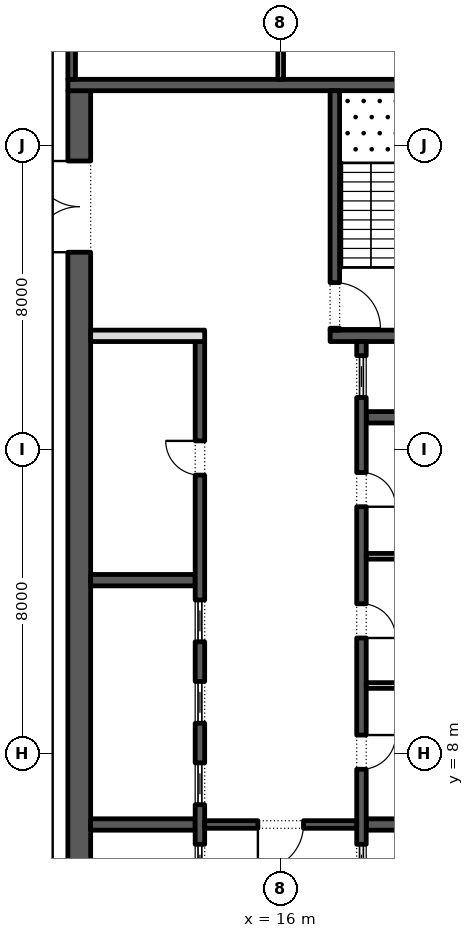
"""IFC4 building model, lengths in metres.
Left out: names, types, materials, properties, quantities, classifications, styles, units other than length and angle.
Written with IfcOpenShell. Run it as: python <this file> out.ifc"""

import sys

from ifc_helpers import new_model, si_unit, direction, frame, frame_2d, origin, place, context, subcontext, project, spatial, rectangle, extrude, element, fill, save


model = new_model("IFC4")
c1 = context("Model", 3, precision=1e-05, world=origin(), true_north=direction((0.0, 1.0)))
c2 = subcontext(c1, "Body", "Model", "MODEL_VIEW")
j1 = project(units=[si_unit("LENGTHUNIT", "METRE"), si_unit("PLANEANGLEUNIT", "RADIAN")], contexts=[c1])
p1 = place(None, origin())
s1 = spatial("IfcSite", under=j1, at=p1, CompositionType="ELEMENT")
p2 = place(p1, origin())
s2 = spatial("IfcBuilding", under=s1, at=p2, CompositionType="ELEMENT")
p3 = place(p2, frame((0.0, 0.0, 289.2)))
s3 = spatial("IfcBuildingStorey", under=s2, at=p3, CompositionType="ELEMENT", Elevation=289.2)
p4 = place(p3, frame((10.7, -2.45, 0.0), z_axis=(0.0, 0.0, 1.0), x_axis=(0.0, 1.0, 0.0)))
e1 = element("IfcWall", 1, at=p4, inside=s3, PredefinedType="SHEAR", context=c2, shape_type="SweptSolid", body=[
    extrude(rectangle(XDim=27.9, YDim=0.6, at=frame_2d((13.95, 0.0))), origin(), (0.0, 0.0, 1.0), 3.95),
])
p5 = place(p4, frame((23.65, 0.0, 0.0)))
e2 = element("IfcOpeningElement", 2, at=p5, cuts=e1, PredefinedType="OPENING", context=c2, shape_type="SweptSolid", body=[
    extrude(rectangle(XDim=2.4, YDim=2.1, at=frame_2d((1.2, 1.05))), frame((0.0, 0.31, 0.0), z_axis=(0.0, -1.0, 0.0), x_axis=(1.0, 0.0, 0.0)), (0.0, 0.0, 1.0), 0.62),
])
p6 = place(p4, frame((1.387, 0.0, 0.0)))
e3 = element("IfcOpeningElement", 3, at=p6, cuts=e1, PredefinedType="OPENING", context=c2, shape_type="SweptSolid", body=[
    extrude(rectangle(XDim=0.9, YDim=2.1, at=frame_2d((0.45, 1.05))), frame((0.0, 0.31, 0.0), z_axis=(0.0, -1.0, 0.0), x_axis=(1.0, 0.0, 0.0)), (0.0, 0.0, 1.0), 0.62),
])
p7 = place(p4, frame((4.562, 0.0, 0.0)))
e4 = element("IfcOpeningElement", 4, at=p7, cuts=e1, PredefinedType="OPENING", context=c2, shape_type="SweptSolid", body=[
    extrude(rectangle(XDim=1.0, YDim=2.1, at=frame_2d((0.5, 1.05))), frame((0.0, 0.31, 0.0), z_axis=(0.0, -1.0, 0.0), x_axis=(1.0, 0.0, 0.0)), (0.0, 0.0, 1.0), 0.62),
])
p8 = place(p3, frame((10.4, 25.6, 0.0), z_axis=(0.0, 0.0, 1.0), x_axis=(1.0, 0.0, 0.0)))
e5 = element("IfcWall", 5, at=p8, inside=s3, PredefinedType="SHEAR", context=c2, shape_type="SweptSolid", body=[
    extrude(rectangle(XDim=11.2, YDim=0.3, at=frame_2d((5.6, 0.0))), origin(), (0.0, 0.0, 1.0), 3.95),
])
p9 = place(p3, frame((17.3, 19.0, 0.0), z_axis=(0.0, 0.0, 1.0), x_axis=(1.0, 0.0, 0.0)))
e6 = element("IfcWall", 6, at=p9, inside=s3, PredefinedType="SHEAR", context=c2, shape_type="SweptSolid", body=[
    extrude(rectangle(XDim=3.7, YDim=0.3, at=frame_2d((1.85, 0.0))), origin(), (0.0, 0.0, 1.0), 3.95),
])
p10 = place(p3, frame((17.425, 19.15, 0.0), z_axis=(0.0, 0.0, 1.0), x_axis=(0.0, 1.0, 0.0)))
e7 = element("IfcWall", 7, at=p10, inside=s3, PredefinedType="SHEAR", context=c2, shape_type="SweptSolid", body=[
    extrude(rectangle(XDim=6.3, YDim=0.25, at=frame_2d((3.15, 0.0))), origin(), (0.0, 0.0, 1.0), 3.95),
])
p11 = place(p10, frame((0.05, 0.0, 0.0)))
e8 = element("IfcOpeningElement", 8, at=p11, cuts=e7, PredefinedType="OPENING", context=c2, shape_type="SweptSolid", body=[
    extrude(rectangle(XDim=1.2, YDim=2.1, at=frame_2d((0.6, 1.05))), frame((0.0, 0.135, 0.0), z_axis=(0.0, -1.0, 0.0), x_axis=(1.0, 0.0, 0.0)), (0.0, 0.0, 1.0), 0.27),
])
for number, where, z_axis, x_axis in (
    (9, (18.25, 6.143, 0.0), (0.0, 0.0, 1.0), (1.0, 0.0, 0.0)),
    (10, (18.25, 16.857, 0.0), (0.0, 0.0, 1.0), (1.0, 0.0, 0.0)),
):
    element("IfcWall", number, at=place(p3, frame(where, z_axis=z_axis, x_axis=x_axis)), inside=s3, PredefinedType="SHEAR", context=c2, shape_type="SweptSolid", body=[
        extrude(rectangle(XDim=2.75, YDim=0.3, at=frame_2d((1.375, 0.0))), origin(), (0.0, 0.0, 1.0), 3.95),
    ])
p12 = place(p3, frame((18.125, 4.15, 0.0), z_axis=(0.0, 0.0, 1.0), x_axis=(0.0, 1.0, 0.0)))
e11 = element("IfcWall", 11, at=p12, inside=s3, PredefinedType="SHEAR", context=c2, shape_type="SweptSolid", body=[
    extrude(rectangle(XDim=14.7, YDim=0.25, at=frame_2d((7.35, 0.0))), origin(), (0.0, 0.0, 1.0), 3.95),
])
p13 = place(p12, frame((3.446, 0.0, 0.0)))
e12 = element("IfcOpeningElement", 12, at=p13, cuts=e11, PredefinedType="OPENING", context=c2, shape_type="SweptSolid", body=[
    extrude(rectangle(XDim=0.9, YDim=2.1, at=frame_2d((0.45, 1.05))), frame((0.0, 0.135, 0.0), z_axis=(0.0, -1.0, 0.0), x_axis=(1.0, 0.0, 0.0)), (0.0, 0.0, 1.0), 0.27),
])
p14 = place(p12, frame((6.9, 0.0, 0.0)))
e13 = element("IfcOpeningElement", 13, at=p14, cuts=e11, PredefinedType="OPENING", context=c2, shape_type="SweptSolid", body=[
    extrude(rectangle(XDim=0.9, YDim=2.1, at=frame_2d((0.45, 1.05))), frame((0.0, 0.135, 0.0), z_axis=(0.0, -1.0, 0.0), x_axis=(1.0, 0.0, 0.0)), (0.0, 0.0, 1.0), 0.27),
])
p15 = place(p12, frame((10.354, 0.0, 0.0)))
e14 = element("IfcOpeningElement", 14, at=p15, cuts=e11, PredefinedType="OPENING", context=c2, shape_type="SweptSolid", body=[
    extrude(rectangle(XDim=0.9, YDim=2.1, at=frame_2d((0.45, 1.05))), frame((0.0, 0.135, 0.0), z_axis=(0.0, -1.0, 0.0), x_axis=(1.0, 0.0, 0.0)), (0.0, 0.0, 1.0), 0.27),
])
p16 = place(p12, frame((0.371, 0.0, 0.0)))
e15 = element("IfcOpeningElement", 15, at=p16, cuts=e11, PredefinedType="OPENING", context=c2, shape_type="SweptSolid", body=[
    extrude(rectangle(XDim=1.1, YDim=2.1, at=frame_2d((0.55, 1.05))), frame((0.0, 0.135, 0.0), z_axis=(0.0, -1.0, 0.0), x_axis=(1.0, 0.0, 0.0)), (0.0, 0.0, 1.0), 0.27),
])
p17 = place(p12, frame((13.229, 0.0, 0.0)))
e16 = element("IfcOpeningElement", 16, at=p17, cuts=e11, PredefinedType="OPENING", context=c2, shape_type="SweptSolid", body=[
    extrude(rectangle(XDim=1.1, YDim=2.1, at=frame_2d((0.55, 1.05))), frame((0.0, 0.135, 0.0), z_axis=(0.0, -1.0, 0.0), x_axis=(1.0, 0.0, 0.0)), (0.0, 0.0, 1.0), 0.27),
])
for number, where, z_axis, x_axis in (
    (17, (18.25, 9.8, 0.0), (0.0, 0.0, 1.0), (1.0, 0.0, 0.0)),
    (18, (18.25, 13.2, 0.0), (0.0, 0.0, 1.0), (1.0, 0.0, 0.0)),
):
    element("IfcWall", number, at=place(p3, frame(where, z_axis=z_axis, x_axis=x_axis)), inside=s3, PredefinedType="PARTITIONING", context=c2, shape_type="SweptSolid", body=[
        extrude(rectangle(XDim=2.75, YDim=0.15, at=frame_2d((1.375, 0.0))), origin(), (0.0, 0.0, 1.0), 3.95),
    ])
for number, where, z_axis, x_axis in (
    (19, (11.0, 6.143, 0.0), (0.0, 0.0, 1.0), (1.0, 0.0, 0.0)),
    (20, (11.0, 12.571, 0.0), (0.0, 0.0, 1.0), (1.0, 0.0, 0.0)),
):
    element("IfcWall", number, at=place(p3, frame(where, z_axis=z_axis, x_axis=x_axis)), inside=s3, PredefinedType="SHEAR", context=c2, shape_type="SweptSolid", body=[
        extrude(rectangle(XDim=2.75, YDim=0.3, at=frame_2d((1.375, 0.0))), origin(), (0.0, 0.0, 1.0), 3.95),
    ])
p18 = place(p3, frame((13.875, -2.45, 0.0), z_axis=(0.0, 0.0, 1.0), x_axis=(0.0, 1.0, 0.0)))
e21 = element("IfcWall", 21, at=p18, inside=s3, PredefinedType="SHEAR", context=c2, shape_type="SweptSolid", body=[
    extrude(rectangle(XDim=21.3, YDim=0.25, at=frame_2d((10.65, 0.0))), origin(), (0.0, 0.0, 1.0), 3.95),
])
p19 = place(p18, frame((17.786, 0.0, 0.0)))
e22 = element("IfcOpeningElement", 22, at=p19, cuts=e21, PredefinedType="OPENING", context=c2, shape_type="SweptSolid", body=[
    extrude(rectangle(XDim=0.9, YDim=2.1, at=frame_2d((0.45, 1.05))), frame((0.0, 0.135, 0.0), z_axis=(0.0, -1.0, 0.0), x_axis=(1.0, 0.0, 0.0)), (0.0, 0.0, 1.0), 0.27),
])
p20 = place(p18, frame((6.971, 0.0, 0.0)))
e23 = element("IfcOpeningElement", 23, at=p20, cuts=e21, PredefinedType="OPENING", context=c2, shape_type="SweptSolid", body=[
    extrude(rectangle(XDim=1.1, YDim=2.1, at=frame_2d((0.55, 1.05))), frame((0.0, 0.135, 0.0), z_axis=(0.0, -1.0, 0.0), x_axis=(1.0, 0.0, 0.0)), (0.0, 0.0, 1.0), 0.27),
])
p21 = place(p18, frame((9.114, 0.0, 0.0)))
e24 = element("IfcOpeningElement", 24, at=p21, cuts=e21, PredefinedType="OPENING", context=c2, shape_type="SweptSolid", body=[
    extrude(rectangle(XDim=1.1, YDim=2.1, at=frame_2d((0.55, 1.05))), frame((0.0, 0.135, 0.0), z_axis=(0.0, -1.0, 0.0), x_axis=(1.0, 0.0, 0.0)), (0.0, 0.0, 1.0), 0.27),
])
p22 = place(p18, frame((11.257, 0.0, 0.0)))
e25 = element("IfcOpeningElement", 25, at=p22, cuts=e21, PredefinedType="OPENING", context=c2, shape_type="SweptSolid", body=[
    extrude(rectangle(XDim=1.1, YDim=2.1, at=frame_2d((0.55, 1.05))), frame((0.0, 0.135, 0.0), z_axis=(0.0, -1.0, 0.0), x_axis=(1.0, 0.0, 0.0)), (0.0, 0.0, 1.0), 0.27),
])
p23 = place(p18, frame((13.4, 0.0, 0.0)))
e26 = element("IfcOpeningElement", 26, at=p23, cuts=e21, PredefinedType="OPENING", context=c2, shape_type="SweptSolid", body=[
    extrude(rectangle(XDim=1.1, YDim=2.1, at=frame_2d((0.55, 1.05))), frame((0.0, 0.135, 0.0), z_axis=(0.0, -1.0, 0.0), x_axis=(1.0, 0.0, 0.0)), (0.0, 0.0, 1.0), 0.27),
])
p24 = place(p3, frame((11.0, 19.0, 0.0), z_axis=(0.0, 0.0, 1.0), x_axis=(1.0, 0.0, 0.0)))
e27 = element("IfcWall", 27, at=p24, inside=s3, PredefinedType="PARTITIONING", context=c2, shape_type="SweptSolid", body=[
    extrude(rectangle(XDim=3.0, YDim=0.3, at=frame_2d((1.5, 0.0))), origin(), (0.0, 0.0, 1.0), 3.95),
])
p25 = place(p3, frame((14.0, 6.143, 0.0), z_axis=(0.0, 0.0, 1.0), x_axis=(1.0, 0.0, 0.0)))
e28 = element("IfcWall", 28, at=p25, inside=s3, PredefinedType="SHEAR", context=c2, shape_type="SweptSolid", body=[
    extrude(rectangle(XDim=4.0, YDim=0.2, at=frame_2d((2.0, 0.0))), origin(), (0.0, 0.0, 1.0), 3.95),
])
p26 = place(p25, frame((1.4, 0.0, 0.0)))
e29 = element("IfcOpeningElement", 29, at=p26, cuts=e28, PredefinedType="OPENING", context=c2, shape_type="SweptSolid", body=[
    extrude(rectangle(XDim=1.2, YDim=2.1, at=frame_2d((0.6, 1.05))), frame((0.0, 0.11, 0.0), z_axis=(0.0, -1.0, 0.0), x_axis=(1.0, 0.0, 0.0)), (0.0, 0.0, 1.0), 0.22),
])
p27 = place(p3, frame((10.5, 25.75, 0.0), z_axis=(0.0, 0.0, 1.0), x_axis=(0.0, 1.0, 0.0)))
e30 = element("IfcWall", 30, at=p27, inside=s3, PredefinedType="SHEAR", context=c2, shape_type="SweptSolid", body=[
    extrude(rectangle(XDim=4.75, YDim=0.2, at=frame_2d((2.375, 0.0))), origin(), (0.0, 0.0, 1.0), 3.95),
])
p28 = place(p27, frame((1.925, 0.0, 0.0)))
e31 = element("IfcOpeningElement", 31, at=p28, cuts=e30, PredefinedType="OPENING", context=c2, shape_type="SweptSolid", body=[
    extrude(rectangle(XDim=0.9, YDim=2.1, at=frame_2d((0.45, 1.05))), frame((0.0, 0.11, 0.0), z_axis=(0.0, -1.0, 0.0), x_axis=(1.0, 0.0, 0.0)), (0.0, 0.0, 1.0), 0.22),
])
p29 = place(p3, frame((16.0, 25.75, 0.0), z_axis=(0.0, 0.0, 1.0), x_axis=(0.0, 1.0, 0.0)))
e32 = element("IfcWall", 32, at=p29, inside=s3, PredefinedType="PARTITIONING", context=c2, shape_type="SweptSolid", body=[
    extrude(rectangle(XDim=4.75, YDim=0.15, at=frame_2d((2.375, 0.0))), origin(), (0.0, 0.0, 1.0), 3.95),
])
p30 = place(p13, frame((0.9, -0.2, 0.0), z_axis=(0.0, 0.0, 1.0), x_axis=(-1.0, 0.0, 0.0)))
e33 = element("IfcDoor", 33, at=p30, inside=s3, OperationType="SINGLE_SWING_RIGHT", PredefinedType="DOOR", context=c2, shape_type="SweptSolid", body=[
    extrude(rectangle(XDim=0.9, YDim=2.1, at=frame_2d((0.45, 1.05))), frame((0.0, -0.075, 0.0), z_axis=(0.0, -1.0, 0.0), x_axis=(1.0, 0.0, 0.0)), (0.0, 0.0, 1.0), 0.05),
])
fill(e12, e33)
p31 = place(p14, frame((0.9, -0.2, 0.0), z_axis=(0.0, 0.0, 1.0), x_axis=(-1.0, 0.0, 0.0)))
e34 = element("IfcDoor", 34, at=p31, inside=s3, OperationType="SINGLE_SWING_LEFT", PredefinedType="DOOR", context=c2, shape_type="SweptSolid", body=[
    extrude(rectangle(XDim=0.9, YDim=2.1, at=frame_2d((0.45, 1.05))), frame((0.0, -0.075, 0.0), z_axis=(0.0, -1.0, 0.0), x_axis=(1.0, 0.0, 0.0)), (0.0, 0.0, 1.0), 0.05),
])
fill(e13, e34)
p32 = place(p15, frame((0.9, -0.2, 0.0), z_axis=(0.0, 0.0, 1.0), x_axis=(-1.0, 0.0, 0.0)))
e35 = element("IfcDoor", 35, at=p32, inside=s3, OperationType="SINGLE_SWING_LEFT", PredefinedType="DOOR", context=c2, shape_type="SweptSolid", body=[
    extrude(rectangle(XDim=0.9, YDim=2.1, at=frame_2d((0.45, 1.05))), frame((0.0, -0.075, 0.0), z_axis=(0.0, -1.0, 0.0), x_axis=(1.0, 0.0, 0.0)), (0.0, 0.0, 1.0), 0.05),
])
fill(e14, e35)
p33 = place(p16, origin())
e36 = element("IfcDoor", 36, at=p33, inside=s3, OperationType="SLIDING_TO_LEFT", PredefinedType="DOOR", context=c2, shape_type="SweptSolid", body=[
    extrude(rectangle(XDim=1.1, YDim=2.1, at=frame_2d((0.55, 1.05))), frame((0.0, 0.025, 0.0), z_axis=(0.0, -1.0, 0.0), x_axis=(1.0, 0.0, 0.0)), (0.0, 0.0, 1.0), 0.05),
])
fill(e15, e36)
p34 = place(p17, origin())
e37 = element("IfcDoor", 37, at=p34, inside=s3, OperationType="SLIDING_TO_LEFT", PredefinedType="DOOR", context=c2, shape_type="SweptSolid", body=[
    extrude(rectangle(XDim=1.1, YDim=2.1, at=frame_2d((0.55, 1.05))), frame((0.0, 0.025, 0.0), z_axis=(0.0, -1.0, 0.0), x_axis=(1.0, 0.0, 0.0)), (0.0, 0.0, 1.0), 0.05),
])
fill(e16, e37)
p35 = place(p19, origin())
e38 = element("IfcDoor", 38, at=p35, inside=s3, OperationType="SINGLE_SWING_LEFT", PredefinedType="DOOR", context=c2, shape_type="SweptSolid", body=[
    extrude(rectangle(XDim=0.9, YDim=2.1, at=frame_2d((0.45, 1.05))), frame((0.0, 0.125, 0.0), z_axis=(0.0, -1.0, 0.0), x_axis=(1.0, 0.0, 0.0)), (0.0, 0.0, 1.0), 0.05),
])
fill(e22, e38)
p36 = place(p20, origin())
e39 = element("IfcDoor", 39, at=p36, inside=s3, OperationType="SLIDING_TO_LEFT", PredefinedType="DOOR", context=c2, shape_type="SweptSolid", body=[
    extrude(rectangle(XDim=1.1, YDim=2.1, at=frame_2d((0.55, 1.05))), frame((0.0, 0.025, 0.0), z_axis=(0.0, -1.0, 0.0), x_axis=(1.0, 0.0, 0.0)), (0.0, 0.0, 1.0), 0.05),
])
fill(e23, e39)
p37 = place(p21, origin())
e40 = element("IfcDoor", 40, at=p37, inside=s3, OperationType="SLIDING_TO_LEFT", PredefinedType="DOOR", context=c2, shape_type="SweptSolid", body=[
    extrude(rectangle(XDim=1.1, YDim=2.1, at=frame_2d((0.55, 1.05))), frame((0.0, 0.025, 0.0), z_axis=(0.0, -1.0, 0.0), x_axis=(1.0, 0.0, 0.0)), (0.0, 0.0, 1.0), 0.05),
])
fill(e24, e40)
p38 = place(p22, origin())
e41 = element("IfcDoor", 41, at=p38, inside=s3, OperationType="SLIDING_TO_LEFT", PredefinedType="DOOR", context=c2, shape_type="SweptSolid", body=[
    extrude(rectangle(XDim=1.1, YDim=2.1, at=frame_2d((0.55, 1.05))), frame((0.0, 0.025, 0.0), z_axis=(0.0, -1.0, 0.0), x_axis=(1.0, 0.0, 0.0)), (0.0, 0.0, 1.0), 0.05),
])
fill(e25, e41)
p39 = place(p23, origin())
e42 = element("IfcDoor", 42, at=p39, inside=s3, OperationType="SLIDING_TO_LEFT", PredefinedType="DOOR", context=c2, shape_type="SweptSolid", body=[
    extrude(rectangle(XDim=1.1, YDim=2.1, at=frame_2d((0.55, 1.05))), frame((0.0, 0.025, 0.0), z_axis=(0.0, -1.0, 0.0), x_axis=(1.0, 0.0, 0.0)), (0.0, 0.0, 1.0), 0.05),
])
fill(e26, e42)
p40 = place(p26, frame((1.2, 0.0, 0.0), z_axis=(0.0, 0.0, 1.0), x_axis=(-1.0, 0.0, 0.0)))
e43 = element("IfcDoor", 43, at=p40, inside=s3, OperationType="SINGLE_SWING_LEFT", PredefinedType="DOOR", context=c2, shape_type="SweptSolid", body=[
    extrude(rectangle(XDim=1.2, YDim=2.1, at=frame_2d((0.6, 1.05))), frame((0.0, 0.025, 0.0), z_axis=(0.0, -1.0, 0.0), x_axis=(1.0, 0.0, 0.0)), (0.0, 0.0, 1.0), 0.05),
])
fill(e29, e43)
p41 = place(p5, origin())
e44 = element("IfcDoor", 44, at=p41, inside=s3, OperationType="DOUBLE_DOOR_SINGLE_SWING", PredefinedType="DOOR", context=c2, shape_type="SweptSolid", body=[
    extrude(rectangle(XDim=2.4, YDim=2.1, at=frame_2d((1.2, 1.05))), frame((0.0, 0.025, 0.0), z_axis=(0.0, -1.0, 0.0), x_axis=(1.0, 0.0, 0.0)), (0.0, 0.0, 1.0), 0.05),
])
fill(e2, e44)
p42 = place(p11, frame((1.2, 0.0, 0.0), z_axis=(0.0, 0.0, 1.0), x_axis=(-1.0, 0.0, 0.0)))
e45 = element("IfcDoor", 45, at=p42, inside=s3, OperationType="SINGLE_SWING_LEFT", PredefinedType="DOOR", context=c2, shape_type="SweptSolid", body=[
    extrude(rectangle(XDim=1.2, YDim=2.1, at=frame_2d((0.6, 1.05))), frame((0.0, 0.025, 0.0), z_axis=(0.0, -1.0, 0.0), x_axis=(1.0, 0.0, 0.0)), (0.0, 0.0, 1.0), 0.05),
])
fill(e8, e45)
save(model, sys.argv[1])
